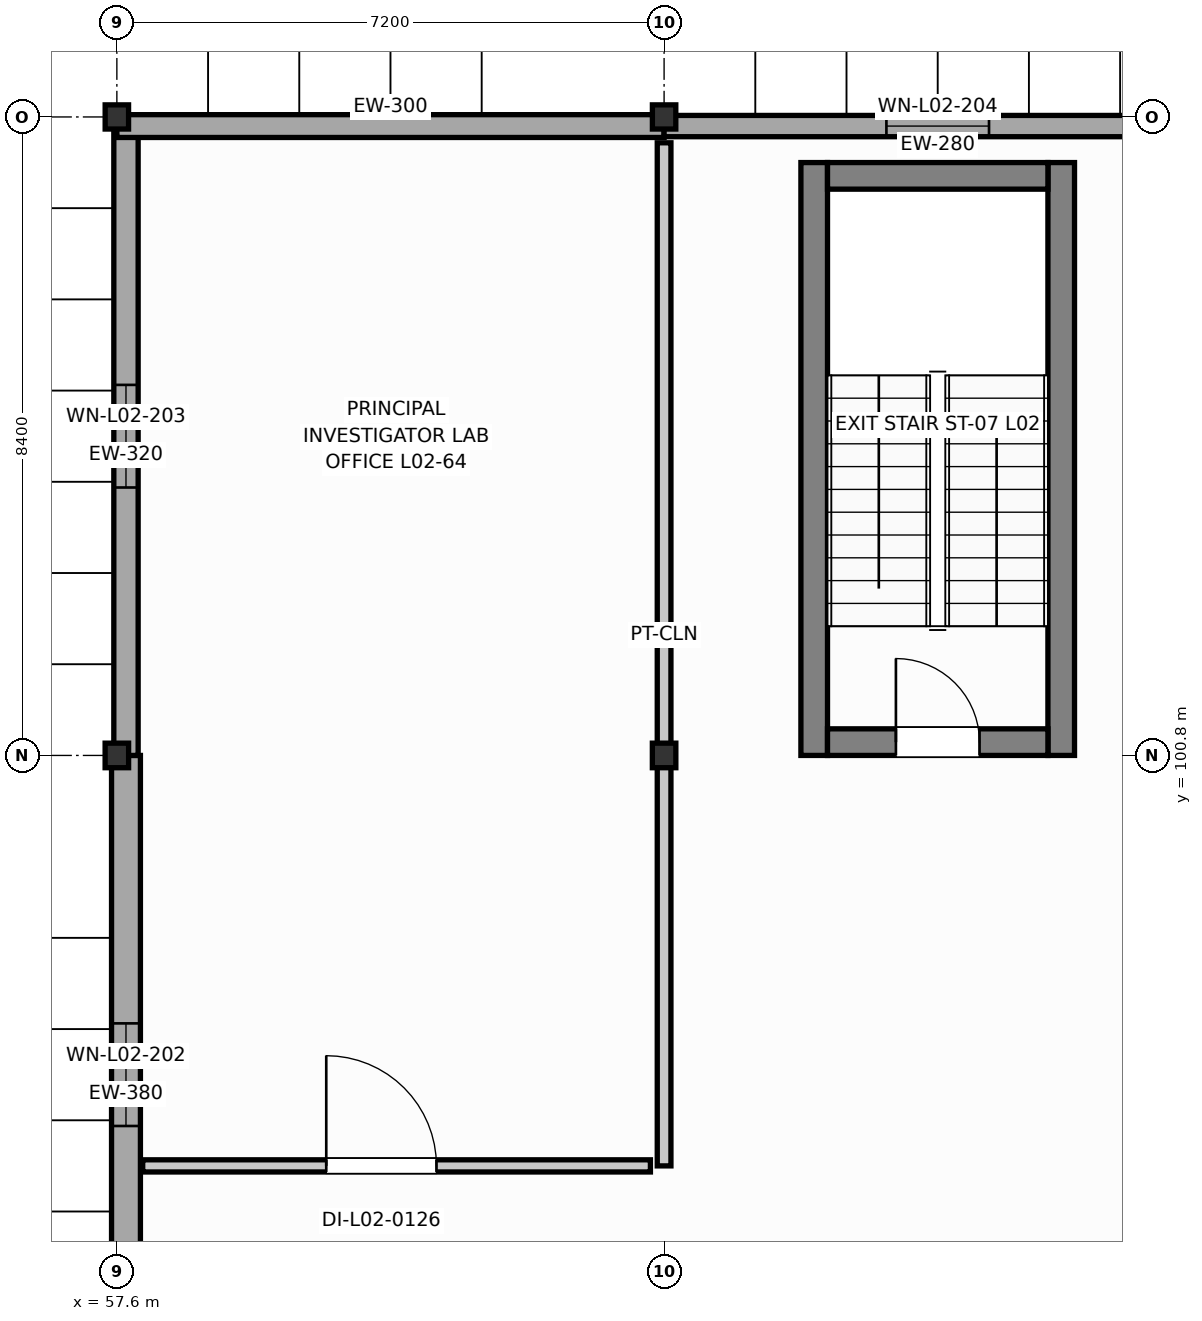
"""IFC4 building model, lengths in metres.
Left out: names, types, materials, properties, quantities, classifications, styles, units other than length and angle.
Written with IfcOpenShell. Run it as: python <this file> out.ifc"""

import sys

from ifc_helpers import new_model, si_unit, direction, frame, frame_2d, origin, origin_2d, place, context, subcontext, project, spatial, rectangle, i_section, extrude, element, fill, save


model = new_model("IFC4")
c1 = context("Model", 3, precision=1e-05, world=origin(), true_north=direction((0.0, 1.0)))
c2 = subcontext(c1, "Body", "Model", "MODEL_VIEW")
j1 = project(units=[si_unit("LENGTHUNIT", "METRE"), si_unit("PLANEANGLEUNIT", "RADIAN")], contexts=[c1])
p1 = place(None, origin())
s1 = spatial("IfcSite", under=j1, at=p1, CompositionType="ELEMENT")
p2 = place(p1, origin())
s2 = spatial("IfcBuilding", under=s1, at=p2, CompositionType="ELEMENT")
p3 = place(p2, frame((0.0, 0.0, 9.0)))
s3 = spatial("IfcBuildingStorey", under=s2, at=p3, CompositionType="ELEMENT", Elevation=9.0)
p4 = place(p3, frame((57.6, 100.8, 0.0), z_axis=(0.0, 0.0, 1.0), x_axis=(1.0, 0.0, 0.0)))
e1 = element("IfcColumn", 1, at=p4, inside=s3, PredefinedType="COLUMN", context=c2, shape_type="SweptSolid", body=[
    extrude(i_section(OverallWidth=0.309, OverallDepth=0.323, WebThickness=0.014, FlangeThickness=0.023, FilletRadius=0.016, at=origin_2d()), origin(), (0.0, 0.0, 1.0), 4.2),
])
p5 = place(p3, frame((57.6, 109.2, 0.0), z_axis=(0.0, 0.0, 1.0), x_axis=(1.0, 0.0, 0.0)))
e2 = element("IfcColumn", 2, at=p5, inside=s3, PredefinedType="COLUMN", context=c2, shape_type="SweptSolid", body=[
    extrude(i_section(OverallWidth=0.308, OverallDepth=0.318, WebThickness=0.013, FlangeThickness=0.021, FilletRadius=0.016, at=origin_2d()), origin(), (0.0, 0.0, 1.0), 4.2),
])
p6 = place(p3, frame((64.8, 100.8, 0.0), z_axis=(0.0, 0.0, 1.0), x_axis=(1.0, 0.0, 0.0)))
e3 = element("IfcColumn", 3, at=p6, inside=s3, PredefinedType="COLUMN", context=c2, shape_type="SweptSolid", body=[
    extrude(i_section(OverallWidth=0.309, OverallDepth=0.323, WebThickness=0.014, FlangeThickness=0.023, FilletRadius=0.016, at=origin_2d()), origin(), (0.0, 0.0, 1.0), 4.2),
])
p7 = place(p3, frame((64.8, 109.2, 0.0), z_axis=(0.0, 0.0, 1.0), x_axis=(1.0, 0.0, 0.0)))
e4 = element("IfcColumn", 4, at=p7, inside=s3, PredefinedType="COLUMN", context=c2, shape_type="SweptSolid", body=[
    extrude(i_section(OverallWidth=0.308, OverallDepth=0.318, WebThickness=0.013, FlangeThickness=0.021, FilletRadius=0.016, at=origin_2d()), origin(), (0.0, 0.0, 1.0), 4.2),
])
for number, where, z_axis, x_axis in (
    (5, (66.775, 100.8, 0.0), (0.0, 0.0, 1.0), (0.0, 1.0, 0.0)),
    (6, (70.025, 100.8, 0.0), (0.0, 0.0, 1.0), (0.0, 1.0, 0.0)),
):
    element("IfcWall", number, at=place(p3, frame(where, z_axis=z_axis, x_axis=x_axis)), inside=s3, PredefinedType="SHEAR", context=c2, shape_type="SweptSolid", body=[
        extrude(rectangle(XDim=7.8, YDim=0.35, at=frame_2d((3.9, 0.0))), origin(), (0.0, 0.0, 1.0), 3.97),
    ])
p8 = place(p3, frame((66.95, 108.425, 0.0), z_axis=(0.0, 0.0, 1.0), x_axis=(1.0, 0.0, 0.0)))
e7 = element("IfcWall", 7, at=p8, inside=s3, PredefinedType="SHEAR", context=c2, shape_type="SweptSolid", body=[
    extrude(rectangle(XDim=2.9, YDim=0.35, at=frame_2d((1.45, 0.0))), origin(), (0.0, 0.0, 1.0), 3.97),
])
p9 = place(p3, frame((66.95, 100.975, 0.0), z_axis=(0.0, 0.0, 1.0), x_axis=(1.0, 0.0, 0.0)))
e8 = element("IfcWall", 8, at=p9, inside=s3, PredefinedType="SHEAR", context=c2, shape_type="SweptSolid", body=[
    extrude(rectangle(XDim=2.9, YDim=0.35, at=frame_2d((1.45, 0.0))), origin(), (0.0, 0.0, 1.0), 3.97),
])
p10 = place(p9, frame((0.9, 0.0, 0.0)))
e9 = element("IfcOpeningElement", 9, at=p10, cuts=e8, PredefinedType="OPENING", context=c2, shape_type="SweptSolid", body=[
    extrude(rectangle(XDim=1.1, YDim=2.15, at=frame_2d((0.55, 1.075))), frame((0.0, 0.185, 0.0), z_axis=(0.0, -1.0, 0.0), x_axis=(1.0, 0.0, 0.0)), (0.0, 0.0, 1.0), 0.37),
])
p11 = place(p3, frame((57.72, 92.4, 0.0), z_axis=(0.0, 0.0, 1.0), x_axis=(0.0, 1.0, 0.0)))
e10 = element("IfcWall", 10, at=p11, inside=s3, PredefinedType="SOLIDWALL", context=c2, shape_type="SweptSolid", body=[
    extrude(rectangle(XDim=8.4, YDim=0.38, at=frame_2d((4.2, 0.0))), origin(), (0.0, 0.0, 1.0), 3.325),
])
p12 = place(p11, frame((3.525, 0.0, 0.95)))
e11 = element("IfcOpeningElement", 11, at=p12, cuts=e10, PredefinedType="OPENING", context=c2, shape_type="SweptSolid", body=[
    extrude(rectangle(XDim=1.35, YDim=1.35, at=frame_2d((0.675, 0.675))), frame((0.0, 0.2, 0.0), z_axis=(0.0, -1.0, 0.0), x_axis=(1.0, 0.0, 0.0)), (0.0, 0.0, 1.0), 0.4),
])
p13 = place(p3, frame((57.72, 100.8, 0.0), z_axis=(0.0, 0.0, 1.0), x_axis=(0.0, 1.0, 0.0)))
e12 = element("IfcWall", 12, at=p13, inside=s3, PredefinedType="SOLIDWALL", context=c2, shape_type="SweptSolid", body=[
    extrude(rectangle(XDim=8.4, YDim=0.32, at=frame_2d((4.2, 0.0))), origin(), (0.0, 0.0, 1.0), 3.325),
])
p14 = place(p13, frame((3.525, 0.0, 0.95)))
e13 = element("IfcOpeningElement", 13, at=p14, cuts=e12, PredefinedType="OPENING", context=c2, shape_type="SweptSolid", body=[
    extrude(rectangle(XDim=1.35, YDim=1.55, at=frame_2d((0.675, 0.775))), frame((0.0, 0.17, 0.0), z_axis=(0.0, -1.0, 0.0), x_axis=(1.0, 0.0, 0.0)), (0.0, 0.0, 1.0), 0.34),
])
p15 = place(p3, frame((57.6, 109.08, 0.0), z_axis=(0.0, 0.0, 1.0), x_axis=(1.0, 0.0, 0.0)))
e14 = element("IfcWall", 14, at=p15, inside=s3, PredefinedType="SOLIDWALL", context=c2, shape_type="SweptSolid", body=[
    extrude(rectangle(XDim=7.2, YDim=0.3, at=frame_2d((3.6, 0.0))), origin(), (0.0, 0.0, 1.0), 3.482),
])
p16 = place(p3, frame((64.8, 109.08, 0.0), z_axis=(0.0, 0.0, 1.0), x_axis=(1.0, 0.0, 0.0)))
e15 = element("IfcWall", 15, at=p16, inside=s3, PredefinedType="SOLIDWALL", context=c2, shape_type="SweptSolid", body=[
    extrude(rectangle(XDim=7.2, YDim=0.28, at=frame_2d((3.6, 0.0))), origin(), (0.0, 0.0, 1.0), 3.482),
])
p17 = place(p16, frame((2.925, 0.0, 0.95)))
e16 = element("IfcOpeningElement", 16, at=p17, cuts=e15, PredefinedType="OPENING", context=c2, shape_type="SweptSolid", body=[
    extrude(rectangle(XDim=1.35, YDim=1.75, at=frame_2d((0.675, 0.875))), frame((0.0, 0.15, 0.0), z_axis=(0.0, -1.0, 0.0), x_axis=(1.0, 0.0, 0.0)), (0.0, 0.0, 1.0), 0.3),
])
p18 = place(p3, frame((64.8, 108.86, 0.0), z_axis=(0.0, 0.0, 1.0), x_axis=(0.0, -1.0, 0.0)))
e17 = element("IfcWall", 17, at=p18, inside=s3, PredefinedType="PARTITIONING", context=c2, shape_type="SweptSolid", body=[
    extrude(rectangle(XDim=13.46, YDim=0.18, at=frame_2d((6.73, 0.0))), origin(), (0.0, 0.0, 1.0), 3.479),
])
p19 = place(p3, frame((64.62, 95.4, 0.0), z_axis=(0.0, 0.0, 1.0), x_axis=(-1.0, 0.0, 0.0)))
e18 = element("IfcWall", 18, at=p19, inside=s3, PredefinedType="PARTITIONING", context=c2, shape_type="SweptSolid", body=[
    extrude(rectangle(XDim=6.68, YDim=0.16, at=frame_2d((3.34, 0.0))), origin(), (0.0, 0.0, 1.0), 3.479),
])
p20 = place(p19, frame((2.815, 0.0, 0.0)))
e19 = element("IfcOpeningElement", 19, at=p20, cuts=e18, PredefinedType="OPENING", context=c2, shape_type="SweptSolid", body=[
    extrude(rectangle(XDim=1.45, YDim=2.2, at=frame_2d((0.725, 1.1))), frame((0.0, 0.09, 0.0), z_axis=(0.0, -1.0, 0.0), x_axis=(1.0, 0.0, 0.0)), (0.0, 0.0, 1.0), 0.18),
])
p21 = place(p10, origin())
e20 = element("IfcDoor", 20, at=p21, inside=s3, OperationType="SINGLE_SWING_LEFT", PredefinedType="DOOR", context=c2, shape_type="SweptSolid", body=[
    extrude(rectangle(XDim=1.1, YDim=2.15, at=frame_2d((0.55, 1.075))), frame((0.0, 0.025, 0.0), z_axis=(0.0, -1.0, 0.0), x_axis=(1.0, 0.0, 0.0)), (0.0, 0.0, 1.0), 0.05),
])
fill(e9, e20)
p22 = place(p12, origin())
e21 = element("IfcWindow", 21, at=p22, inside=s3, PartitioningType="SINGLE_PANEL", PredefinedType="WINDOW", context=c2, shape_type="SweptSolid", body=[
    extrude(rectangle(XDim=1.35, YDim=1.35, at=frame_2d((0.675, 0.675))), frame((0.0, 0.03, 0.0), z_axis=(0.0, -1.0, 0.0), x_axis=(1.0, 0.0, 0.0)), (0.0, 0.0, 1.0), 0.06),
])
fill(e11, e21)
p23 = place(p14, origin())
e22 = element("IfcWindow", 22, at=p23, inside=s3, PartitioningType="SINGLE_PANEL", PredefinedType="WINDOW", context=c2, shape_type="SweptSolid", body=[
    extrude(rectangle(XDim=1.35, YDim=1.55, at=frame_2d((0.675, 0.775))), frame((0.0, 0.03, 0.0), z_axis=(0.0, -1.0, 0.0), x_axis=(1.0, 0.0, 0.0)), (0.0, 0.0, 1.0), 0.06),
])
fill(e13, e22)
p24 = place(p17, origin())
e23 = element("IfcWindow", 23, at=p24, inside=s3, PartitioningType="SINGLE_PANEL", PredefinedType="WINDOW", context=c2, shape_type="SweptSolid", body=[
    extrude(rectangle(XDim=1.35, YDim=1.75, at=frame_2d((0.675, 0.875))), frame((0.0, 0.03, 0.0), z_axis=(0.0, -1.0, 0.0), x_axis=(1.0, 0.0, 0.0)), (0.0, 0.0, 1.0), 0.06),
])
fill(e16, e23)
p25 = place(p20, frame((1.45, 0.0, 0.0), z_axis=(0.0, 0.0, 1.0), x_axis=(-1.0, 0.0, 0.0)))
e24 = element("IfcDoor", 24, at=p25, inside=s3, OperationType="SINGLE_SWING_LEFT", PredefinedType="DOOR", context=c2, shape_type="SweptSolid", body=[
    extrude(rectangle(XDim=1.45, YDim=2.2, at=frame_2d((0.725, 1.1))), frame((0.0, 0.025, 0.0), z_axis=(0.0, -1.0, 0.0), x_axis=(1.0, 0.0, 0.0)), (0.0, 0.0, 1.0), 0.05),
])
fill(e19, e24)
save(model, sys.argv[1])
